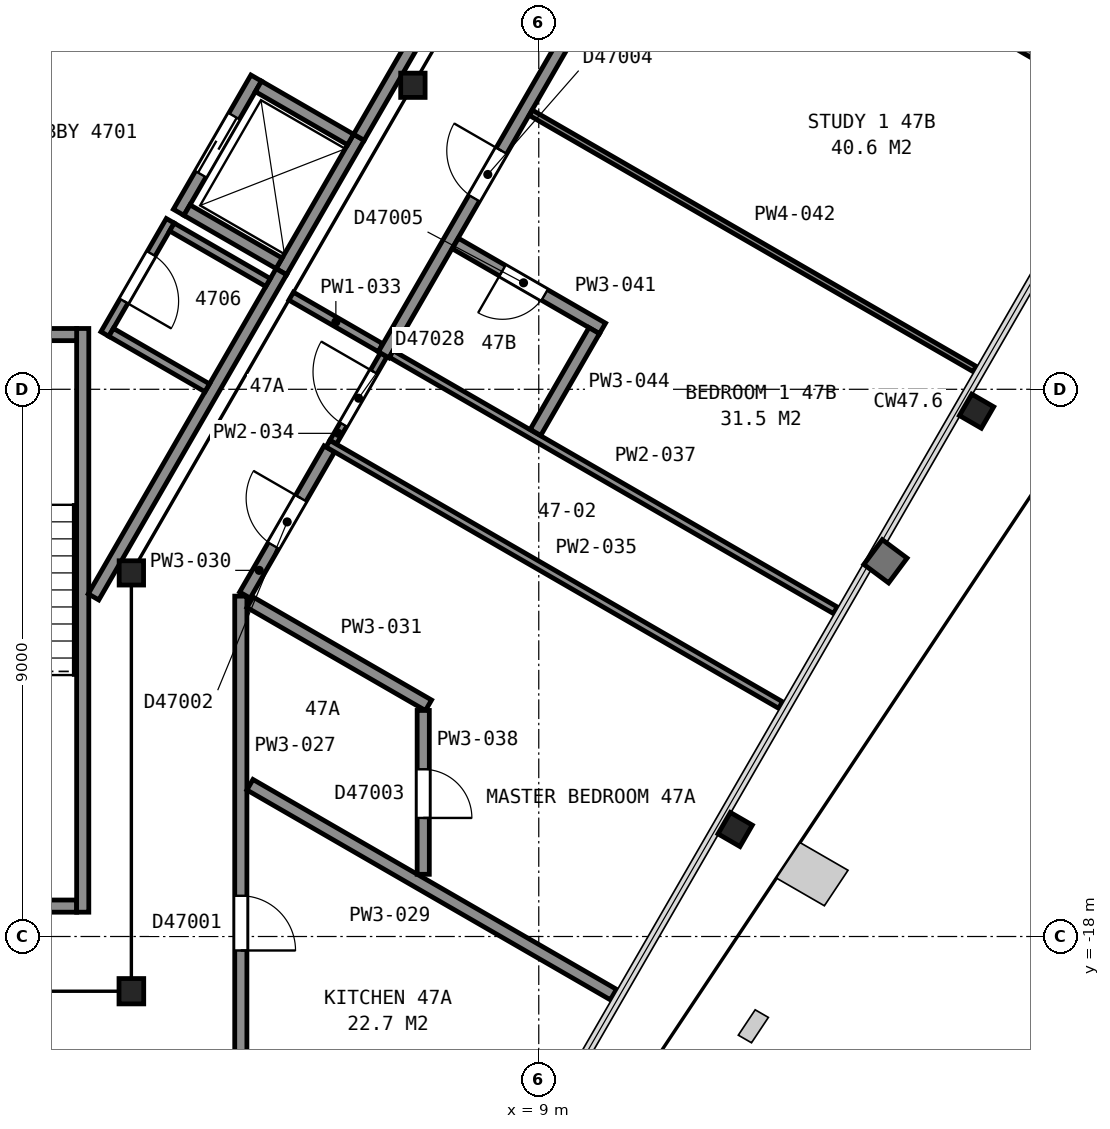
"""IFC4 building model, lengths in metres.
Left out: names, types, materials, properties, quantities, classifications, styles, units other than length and angle.
Written with IfcOpenShell. Run it as: python <this file> out.ifc"""

import sys

from ifc_helpers import new_model, si_unit, direction, frame, frame_2d, origin, origin_2d, place, context, subcontext, project, spatial, rectangle, i_section, extrude, element, fill, save


model = new_model("IFC4")
c1 = context("Model", 3, precision=1e-05, world=origin(), true_north=direction((0.0, 1.0)))
c2 = subcontext(c1, "Body", "Model", "MODEL_VIEW")
j1 = project(units=[si_unit("LENGTHUNIT", "METRE"), si_unit("PLANEANGLEUNIT", "RADIAN")], contexts=[c1])
p1 = place(None, origin())
s1 = spatial("IfcSite", under=j1, at=p1, CompositionType="ELEMENT")
p2 = place(p1, origin())
s2 = spatial("IfcBuilding", under=s1, at=p2, CompositionType="ELEMENT")
p3 = place(p2, frame((0.0, 0.0, 189.5)))
s3 = spatial("IfcBuildingStorey", under=s2, at=p3, CompositionType="ELEMENT", Elevation=189.5)
p4 = place(p3, frame((12.23, -16.24, 0.035), z_axis=(0.0, 0.0, 1.0), x_axis=(-0.5, -0.866025403784, 0.0)))
e1 = element("IfcColumn", 1, at=p4, inside=s3, PredefinedType="COLUMN", context=c2, shape_type="SweptSolid", body=[
    extrude(i_section(OverallWidth=0.406, OverallDepth=0.417, WebThickness=0.03, FlangeThickness=0.048, FilletRadius=0.015, at=origin_2d()), origin(), (0.0, 0.0, 1.0), 3.665),
])
p5 = place(p3, frame((16.2, -9.36, 0.03), z_axis=(0.0, 0.0, 1.0), x_axis=(-0.5, -0.866025403784, 0.0)))
e2 = element("IfcColumn", 2, at=p5, inside=s3, PredefinedType="COLUMN", context=c2, shape_type="SweptSolid", body=[
    extrude(i_section(OverallWidth=0.406, OverallDepth=0.417, WebThickness=0.03, FlangeThickness=0.048, FilletRadius=0.015, at=origin_2d()), origin(), (0.0, 0.0, 1.0), 3.67),
])
p6 = place(p3, frame((2.3, -18.9, 0.0), z_axis=(0.0, 0.0, 1.0), x_axis=(-1.0, 0.0, 0.0)))
e3 = element("IfcColumn", 3, at=p6, inside=s3, PredefinedType="COLUMN", context=c2, shape_type="SweptSolid", body=[
    extrude(i_section(OverallWidth=0.406, OverallDepth=0.417, WebThickness=0.03, FlangeThickness=0.048, FilletRadius=0.015, at=origin_2d()), origin(), (0.0, 0.0, 1.0), 3.7),
])
for number, where, z_axis, x_axis in (
    (4, (2.3, -12.02, 0.0), (0.0, 0.0, 1.0), (1.0, 0.0, 0.0)),
    (5, (6.93, -4.0, 0.0), (0.0, 0.0, 1.0), (1.0, 0.0, 0.0)),
):
    element("IfcColumn", number, at=place(p3, frame(where, z_axis=z_axis, x_axis=x_axis)), inside=s3, PredefinedType="COLUMN", context=c2, shape_type="SweptSolid", body=[
        extrude(i_section(OverallWidth=0.401, OverallDepth=0.399, WebThickness=0.025, FlangeThickness=0.04, FilletRadius=0.015, at=origin_2d()), origin(), (0.0, 0.0, 1.0), 3.7),
    ])
p7 = place(p3, frame((-1.4, -17.5, 0.0), z_axis=(0.0, 0.0, 1.0), x_axis=(1.0, 0.0, 0.0)))
e6 = element("IfcWall", 6, at=p7, inside=s3, PredefinedType="PARTITIONING", context=c2, shape_type="SweptSolid", body=[
    extrude(rectangle(XDim=2.8, YDim=0.2, at=frame_2d((1.4, 0.0))), origin(), (0.0, 0.0, 1.0), 3.45),
])
p8 = place(p7, frame((0.85, 0.0, 0.0)))
e7 = element("IfcOpeningElement", 7, at=p8, cuts=e6, PredefinedType="OPENING", context=c2, shape_type="SweptSolid", body=[
    extrude(rectangle(XDim=1.1, YDim=2.1, at=frame_2d((0.55, 1.05))), frame((0.0, 0.11, 0.0), z_axis=(0.0, -1.0, 0.0), x_axis=(1.0, 0.0, 0.0)), (0.0, 0.0, 1.0), 0.22),
])
p9 = place(p3, frame((1.5, -8.0, 0.0), z_axis=(0.0, 0.0, 1.0), x_axis=(0.0, -1.0, 0.0)))
e8 = element("IfcWall", 8, at=p9, inside=s3, PredefinedType="PARTITIONING", context=c2, shape_type="SweptSolid", body=[
    extrude(rectangle(XDim=9.6, YDim=0.2, at=frame_2d((4.8, 0.0))), origin(), (0.0, 0.0, 1.0), 3.45),
])
p10 = place(p3, frame((-1.4, -8.1, 0.0), z_axis=(0.0, 0.0, 1.0), x_axis=(1.0, 0.0, 0.0)))
e9 = element("IfcWall", 9, at=p10, inside=s3, PredefinedType="PARTITIONING", context=c2, shape_type="SweptSolid", body=[
    extrude(rectangle(XDim=2.8, YDim=0.2, at=frame_2d((1.4, 0.0))), origin(), (0.0, 0.0, 1.0), 3.45),
])
p11 = place(p3, frame((4.766, -7.065, 0.0), z_axis=(0.0, 0.0, 1.0), x_axis=(0.499948979701, 0.866054858364, 0.0)))
e10 = element("IfcWall", 10, at=p11, inside=s3, PredefinedType="PARTITIONING", context=c2, shape_type="SweptSolid", body=[
    extrude(rectangle(XDim=2.55, YDim=0.2, at=frame_2d((1.275, 0.0))), origin(), (0.0, 0.0, 1.0), 3.7),
])
p12 = place(p3, frame((3.077, -6.09, 0.0), z_axis=(0.0, 0.0, 1.0), x_axis=(0.500062241894, 0.865989465428, 0.0)))
e11 = element("IfcWall", 11, at=p12, inside=s3, PredefinedType="PARTITIONING", context=c2, shape_type="SweptSolid", body=[
    extrude(rectangle(XDim=2.55, YDim=0.2, at=frame_2d((1.275, 0.0))), origin(), (0.0, 0.0, 1.0), 3.7),
])
p13 = place(p12, frame((0.725, 0.0, 0.0)))
e12 = element("IfcOpeningElement", 12, at=p13, cuts=e11, PredefinedType="OPENING", context=c2, shape_type="SweptSolid", body=[
    extrude(rectangle(XDim=1.1, YDim=2.1, at=frame_2d((0.55, 1.05))), frame((0.0, 0.11, 0.0), z_axis=(0.0, -1.0, 0.0), x_axis=(1.0, 0.0, 0.0)), (0.0, 0.0, 1.0), 0.22),
])
p14 = place(p3, frame((5.905, -4.893, 0.0), z_axis=(0.0, 0.0, 1.0), x_axis=(-0.866002029911, 0.500040482552, 0.0)))
e13 = element("IfcWall", 13, at=p14, inside=s3, PredefinedType="PARTITIONING", context=c2, shape_type="SweptSolid", body=[
    extrude(rectangle(XDim=1.75, YDim=0.2, at=frame_2d((0.875, 0.0))), origin(), (0.0, 0.0, 1.0), 3.7),
])
p15 = place(p3, frame((4.73, -6.928, 0.0), z_axis=(0.0, 0.0, 1.0), x_axis=(-0.866036909293, 0.499980071345, 0.0)))
e14 = element("IfcWall", 14, at=p15, inside=s3, PredefinedType="PARTITIONING", context=c2, shape_type="SweptSolid", body=[
    extrude(rectangle(XDim=1.75, YDim=0.2, at=frame_2d((0.875, 0.0))), origin(), (0.0, 0.0, 1.0), 3.7),
])
p16 = place(p3, frame((1.677, -12.415, 0.0), z_axis=(0.0, 0.0, 1.0), x_axis=(0.500054337157, 0.865994029939, 0.0)))
e15 = element("IfcWall", 15, at=p16, inside=s3, PredefinedType="PARTITIONING", context=c2, shape_type="SweptSolid", body=[
    extrude(rectangle(XDim=6.177, YDim=0.2, at=frame_2d((3.088, 0.0))), origin(), (0.0, 0.0, 1.0), 3.45),
])
p17 = place(p3, frame((2.939, -6.229, 0.0), z_axis=(0.0, 0.0, 1.0), x_axis=(-0.499961633463, -0.866047553582, 0.0)))
e16 = element("IfcWall", 16, at=p17, inside=s3, PredefinedType="PARTITIONING", context=c2, shape_type="SweptSolid", body=[
    extrude(rectangle(XDim=2.15, YDim=0.15, at=frame_2d((1.075, 0.0))), origin(), (0.0, 0.0, 1.0), 3.45),
])
p18 = place(p17, frame((0.625, 0.0, 0.0)))
e17 = element("IfcOpeningElement", 17, at=p18, cuts=e16, PredefinedType="OPENING", context=c2, shape_type="SweptSolid", body=[
    extrude(rectangle(XDim=0.9, YDim=2.1, at=frame_2d((0.45, 1.05))), frame((0.0, 0.085, 0.0), z_axis=(0.0, -1.0, 0.0), x_axis=(1.0, 0.0, 0.0)), (0.0, 0.0, 1.0), 0.17),
])
p19 = place(p3, frame((1.967, -8.063, 0.0), z_axis=(0.0, 0.0, 1.0), x_axis=(0.865978377894, -0.500081442387, 0.0)))
e18 = element("IfcWall", 18, at=p19, inside=s3, PredefinedType="PARTITIONING", context=c2, shape_type="SweptSolid", body=[
    extrude(rectangle(XDim=1.825, YDim=0.15, at=frame_2d((0.913, 0.0))), origin(), (0.0, 0.0, 1.0), 3.45),
])
p20 = place(p3, frame((2.967, -6.332, 0.0), z_axis=(0.0, 0.0, 1.0), x_axis=(0.866036312054, -0.499981105847, 0.0)))
e19 = element("IfcWall", 19, at=p20, inside=s3, PredefinedType="PARTITIONING", context=c2, shape_type="SweptSolid", body=[
    extrude(rectangle(XDim=1.825, YDim=0.15, at=frame_2d((0.912, 0.0))), origin(), (0.0, 0.0, 1.0), 3.45),
])
p21 = place(p3, frame((6.042, -4.855, 0.0), z_axis=(0.0, 0.0, 1.0), x_axis=(0.500252727967, 0.865879442048, 0.0)))
e20 = element("IfcWall", 20, at=p21, inside=s3, PredefinedType="PARTITIONING", context=c2, shape_type="SweptSolid", body=[
    extrude(rectangle(XDim=2.617, YDim=0.2, at=frame_2d((1.309, 0.0))), origin(), (0.0, 0.0, 1.0), 3.45),
])
p22 = place(p3, frame((4.1, -12.402, 0.0), z_axis=(0.0, 0.0, 1.0), x_axis=(0.0, -1.0, 0.0)))
e21 = element("IfcWall", 21, at=p22, inside=s3, PredefinedType="PARTITIONING", context=c2, shape_type="SweptSolid", body=[
    extrude(rectangle(XDim=8.248, YDim=0.2, at=frame_2d((4.124, 0.0))), origin(), (0.0, 0.0, 1.0), 2.713),
])
p23 = place(p22, frame((4.928, 0.0, 0.0)))
e22 = element("IfcOpeningElement", 22, at=p23, cuts=e21, PredefinedType="OPENING", context=c2, shape_type="SweptSolid", body=[
    extrude(rectangle(XDim=0.9, YDim=2.1, at=frame_2d((0.45, 1.05))), frame((0.0, 0.11, 0.0), z_axis=(0.0, -1.0, 0.0), x_axis=(1.0, 0.0, 0.0)), (0.0, 0.0, 1.0), 0.22),
])
p24 = place(p3, frame((4.25, -15.504, 0.0), z_axis=(0.0, 0.0, 1.0), x_axis=(0.866025383743, -0.500000034713, 0.0)))
e23 = element("IfcWall", 23, at=p24, inside=s3, PredefinedType="PARTITIONING", context=c2, shape_type="SweptSolid", body=[
    extrude(rectangle(XDim=6.903, YDim=0.2, at=frame_2d((3.451, 0.0))), origin(), (0.0, 0.0, 1.0), 2.713),
])
p25 = place(p3, frame((5.556, -9.98, 0.0), z_axis=(0.0, 0.0, 1.0), x_axis=(-0.499940639567, -0.866059672834, 0.0)))
e24 = element("IfcWall", 24, at=p25, inside=s3, PredefinedType="PARTITIONING", context=c2, shape_type="SweptSolid", body=[
    extrude(rectangle(XDim=2.777, YDim=0.2, at=frame_2d((1.388, 0.0))), origin(), (0.0, 0.0, 1.0), 2.713),
])
p26 = place(p25, frame((0.937, 0.0, 0.0)))
e25 = element("IfcOpeningElement", 25, at=p26, cuts=e24, PredefinedType="OPENING", context=c2, shape_type="SweptSolid", body=[
    extrude(rectangle(XDim=0.9, YDim=2.1, at=frame_2d((0.45, 1.05))), frame((0.0, 0.11, 0.0), z_axis=(0.0, -1.0, 0.0), x_axis=(1.0, 0.0, 0.0)), (0.0, 0.0, 1.0), 0.22),
])
p27 = place(p3, frame((4.25, -12.502, 0.0), z_axis=(0.0, 0.0, 1.0), x_axis=(0.866032087317, -0.499988423603, 0.0)))
e26 = element("IfcWall", 26, at=p27, inside=s3, PredefinedType="PARTITIONING", context=c2, shape_type="SweptSolid", body=[
    extrude(rectangle(XDim=3.39, YDim=0.2, at=frame_2d((1.695, 0.0))), origin(), (0.0, 0.0, 1.0), 2.713),
])
p28 = place(p3, frame((4.928, -7.468, 0.0), z_axis=(0.0, 0.0, 1.0), x_axis=(0.866075426483, -0.499913348133, 0.0)))
e27 = element("IfcWall", 27, at=p28, inside=s3, PredefinedType="PARTITIONING", context=c2, shape_type="SweptSolid", body=[
    extrude(rectangle(XDim=1.698, YDim=0.15, at=frame_2d((0.849, 0.0))), origin(), (0.0, 0.0, 1.0), 2.713),
])
p29 = place(p3, frame((5.62, -9.87, 0.0), z_axis=(0.0, 0.0, 1.0), x_axis=(0.500142759665, 0.865942965763, 0.0)))
e28 = element("IfcWall", 28, at=p29, inside=s3, PredefinedType="PARTITIONING", context=c2, shape_type="SweptSolid", body=[
    extrude(rectangle(XDim=1.659, YDim=0.125, at=frame_2d((0.83, 0.0))), origin(), (0.0, 0.0, 1.0), 2.713),
])
p30 = place(p29, frame((0.335, 0.0, 0.0)))
e29 = element("IfcOpeningElement", 29, at=p30, cuts=e28, PredefinedType="OPENING", context=c2, shape_type="SweptSolid", body=[
    extrude(rectangle(XDim=1.0, YDim=2.1, at=frame_2d((0.5, 1.05))), frame((0.0, 0.073, 0.0), z_axis=(0.0, -1.0, 0.0), x_axis=(1.0, 0.0, 0.0)), (0.0, 0.0, 1.0), 0.145),
])
p31 = place(p3, frame((5.533, -9.895, 0.0), z_axis=(0.0, 0.0, 1.0), x_axis=(0.865995449608, -0.500051878567, 0.0)))
e30 = element("IfcWall", 30, at=p31, inside=s3, PredefinedType="PARTITIONING", context=c2, shape_type="SweptSolid", body=[
    extrude(rectangle(XDim=8.596, YDim=0.125, at=frame_2d((4.298, 0.0))), origin(), (0.0, 0.0, 1.0), 2.713),
])
p32 = place(p3, frame((12.903, 2.745, 0.0), z_axis=(0.0, 0.0, 1.0), x_axis=(-0.499992063946, -0.866029985619, 0.0)))
e31 = element("IfcWall", 31, at=p32, inside=s3, PredefinedType="PARTITIONING", context=c2, shape_type="SweptSolid", body=[
    extrude(rectangle(XDim=12.907, YDim=0.2, at=frame_2d((6.454, 0.0))), origin(), (0.0, 0.0, 1.0), 2.713),
])
p33 = place(p32, frame((9.032, 0.0, 0.0)))
e32 = element("IfcOpeningElement", 32, at=p33, cuts=e31, PredefinedType="OPENING", context=c2, shape_type="SweptSolid", body=[
    extrude(rectangle(XDim=0.9, YDim=2.1, at=frame_2d((0.45, 1.05))), frame((0.0, 0.11, 0.0), z_axis=(0.0, -1.0, 0.0), x_axis=(1.0, 0.0, 0.0)), (0.0, 0.0, 1.0), 0.22),
])
p34 = place(p32, frame((5.349, 0.0, 0.0)))
e33 = element("IfcOpeningElement", 33, at=p34, cuts=e31, PredefinedType="OPENING", context=c2, shape_type="SweptSolid", body=[
    extrude(rectangle(XDim=0.9, YDim=2.1, at=frame_2d((0.45, 1.05))), frame((0.0, 0.11, 0.0), z_axis=(0.0, -1.0, 0.0), x_axis=(1.0, 0.0, 0.0)), (0.0, 0.0, 1.0), 0.22),
])
p35 = place(p3, frame((6.576, -8.419, 0.0), z_axis=(0.0, 0.0, 1.0), x_axis=(0.866048155274, -0.499960591193, 0.0)))
e34 = element("IfcWall", 34, at=p35, inside=s3, PredefinedType="PARTITIONING", context=c2, shape_type="SweptSolid", body=[
    extrude(rectangle(XDim=8.431, YDim=0.125, at=frame_2d((4.215, 0.0))), origin(), (0.0, 0.0, 1.0), 2.713),
])
p36 = place(p3, frame((7.1, -16.977, 0.0), z_axis=(0.0, 0.0, 1.0), x_axis=(0.0, 1.0, 0.0)))
e35 = element("IfcWall", 35, at=p36, inside=s3, PredefinedType="PARTITIONING", context=c2, shape_type="SweptSolid", body=[
    extrude(rectangle(XDim=2.695, YDim=0.2, at=frame_2d((1.347, 0.0))), origin(), (0.0, 0.0, 1.0), 2.713),
])
p37 = place(p36, frame((0.927, 0.0, 0.0)))
e36 = element("IfcOpeningElement", 36, at=p37, cuts=e35, PredefinedType="OPENING", context=c2, shape_type="SweptSolid", body=[
    extrude(rectangle(XDim=0.8, YDim=2.1, at=frame_2d((0.4, 1.05))), frame((0.0, 0.11, 0.0), z_axis=(0.0, -1.0, 0.0), x_axis=(1.0, 0.0, 0.0)), (0.0, 0.0, 1.0), 0.22),
])
p38 = place(p3, frame((10.049, -7.999, 0.0), z_axis=(0.0, 0.0, 1.0), x_axis=(-0.866041588165, 0.499971966783, 0.0)))
e37 = element("IfcWall", 37, at=p38, inside=s3, PredefinedType="PARTITIONING", context=c2, shape_type="SweptSolid", body=[
    extrude(rectangle(XDim=2.795, YDim=0.2, at=frame_2d((1.397, 0.0))), origin(), (0.0, 0.0, 1.0), 2.713),
])
p39 = place(p38, frame((1.1, 0.0, 0.0)))
e38 = element("IfcOpeningElement", 38, at=p39, cuts=e37, PredefinedType="OPENING", context=c2, shape_type="SweptSolid", body=[
    extrude(rectangle(XDim=0.8, YDim=2.1, at=frame_2d((0.4, 1.05))), frame((0.0, 0.11, 0.0), z_axis=(0.0, -1.0, 0.0), x_axis=(1.0, 0.0, 0.0)), (0.0, 0.0, 1.0), 0.22),
])
p40 = place(p3, frame((8.869, -4.451, 0.0), z_axis=(0.0, 0.0, 1.0), x_axis=(0.866027858276, -0.499995748672, 0.0)))
e39 = element("IfcWall", 39, at=p40, inside=s3, PredefinedType="PARTITIONING", context=c2, shape_type="SweptSolid", body=[
    extrude(rectangle(XDim=8.429, YDim=0.1, at=frame_2d((4.214, 0.0))), origin(), (0.0, 0.0, 1.0), 2.713),
])
p41 = place(p3, frame((8.946, -9.709, 0.0), z_axis=(0.0, 0.0, 1.0), x_axis=(0.499970304126, 0.866042548026, 0.0)))
e40 = element("IfcWall", 40, at=p41, inside=s3, PredefinedType="PARTITIONING", context=c2, shape_type="SweptSolid", body=[
    extrude(rectangle(XDim=1.933, YDim=0.2, at=frame_2d((0.966, 0.0))), origin(), (0.0, 0.0, 1.0), 2.713),
])
p42 = place(p3, frame((11.343, -0.166, 0.0), z_axis=(0.0, 0.0, 1.0), x_axis=(0.866022557401, -0.500004930048, 0.0)))
e41 = element("IfcWall", 41, at=p42, inside=s3, PredefinedType="PARTITIONING", context=c2, shape_type="SweptSolid", body=[
    extrude(rectangle(XDim=8.429, YDim=0.1, at=frame_2d((4.215, 0.0))), origin(), (0.0, 0.0, 1.0), 2.713),
])
p43 = place(p13, origin())
e42 = element("IfcDoor", 42, at=p43, inside=s3, OperationType="SLIDING_TO_LEFT", PredefinedType="DOOR", context=c2, shape_type="SweptSolid", body=[
    extrude(rectangle(XDim=1.1, YDim=2.1, at=frame_2d((0.55, 1.05))), frame((0.0, 0.025, 0.0), z_axis=(0.0, -1.0, 0.0), x_axis=(1.0, 0.0, 0.0)), (0.0, 0.0, 1.0), 0.05),
])
fill(e12, e42)
p44 = place(p18, origin())
e43 = element("IfcDoor", 43, at=p44, inside=s3, OperationType="SINGLE_SWING_RIGHT", PredefinedType="DOOR", context=c2, shape_type="SweptSolid", body=[
    extrude(rectangle(XDim=0.9, YDim=2.1, at=frame_2d((0.45, 1.05))), frame((0.0, 0.025, 0.0), z_axis=(0.0, -1.0, 0.0), x_axis=(1.0, 0.0, 0.0)), (0.0, 0.0, 1.0), 0.05),
])
fill(e17, e43)
p45 = place(p23, origin())
e44 = element("IfcDoor", 44, at=p45, inside=s3, OperationType="SINGLE_SWING_RIGHT", PredefinedType="DOOR", context=c2, shape_type="SweptSolid", body=[
    extrude(rectangle(XDim=0.9, YDim=2.1, at=frame_2d((0.45, 1.05))), frame((0.0, 0.025, 0.0), z_axis=(0.0, -1.0, 0.0), x_axis=(1.0, 0.0, 0.0)), (0.0, 0.0, 1.0), 0.05),
])
fill(e22, e44)
p46 = place(p26, origin())
e45 = element("IfcDoor", 45, at=p46, inside=s3, OperationType="SINGLE_SWING_LEFT", PredefinedType="DOOR", context=c2, shape_type="SweptSolid", body=[
    extrude(rectangle(XDim=0.9, YDim=2.1, at=frame_2d((0.45, 1.05))), frame((0.0, 0.025, 0.0), z_axis=(0.0, -1.0, 0.0), x_axis=(1.0, 0.0, 0.0)), (0.0, 0.0, 1.0), 0.05),
])
fill(e25, e45)
p47 = place(p30, origin())
e46 = element("IfcDoor", 46, at=p47, inside=s3, OperationType="SINGLE_SWING_RIGHT", PredefinedType="DOOR", context=c2, shape_type="SweptSolid", body=[
    extrude(rectangle(XDim=1.0, YDim=2.1, at=frame_2d((0.5, 1.05))), frame((0.0, 0.025, 0.0), z_axis=(0.0, -1.0, 0.0), x_axis=(1.0, 0.0, 0.0)), (0.0, 0.0, 1.0), 0.05),
])
fill(e29, e46)
p48 = place(p33, origin())
e47 = element("IfcDoor", 47, at=p48, inside=s3, OperationType="SINGLE_SWING_LEFT", PredefinedType="DOOR", context=c2, shape_type="SweptSolid", body=[
    extrude(rectangle(XDim=0.9, YDim=2.1, at=frame_2d((0.45, 1.05))), frame((0.0, 0.025, 0.0), z_axis=(0.0, -1.0, 0.0), x_axis=(1.0, 0.0, 0.0)), (0.0, 0.0, 1.0), 0.05),
])
fill(e32, e47)
p49 = place(p37, origin())
e48 = element("IfcDoor", 48, at=p49, inside=s3, OperationType="SINGLE_SWING_LEFT", PredefinedType="DOOR", context=c2, shape_type="SweptSolid", body=[
    extrude(rectangle(XDim=0.8, YDim=2.1, at=frame_2d((0.4, 1.05))), frame((0.0, 0.025, 0.0), z_axis=(0.0, -1.0, 0.0), x_axis=(1.0, 0.0, 0.0)), (0.0, 0.0, 1.0), 0.05),
])
fill(e36, e48)
p50 = place(p39, origin())
e49 = element("IfcDoor", 49, at=p50, inside=s3, OperationType="SINGLE_SWING_RIGHT", PredefinedType="DOOR", context=c2, shape_type="SweptSolid", body=[
    extrude(rectangle(XDim=0.8, YDim=2.1, at=frame_2d((0.4, 1.05))), frame((0.0, 0.025, 0.0), z_axis=(0.0, -1.0, 0.0), x_axis=(1.0, 0.0, 0.0)), (0.0, 0.0, 1.0), 0.05),
])
fill(e38, e49)
save(model, sys.argv[1])
